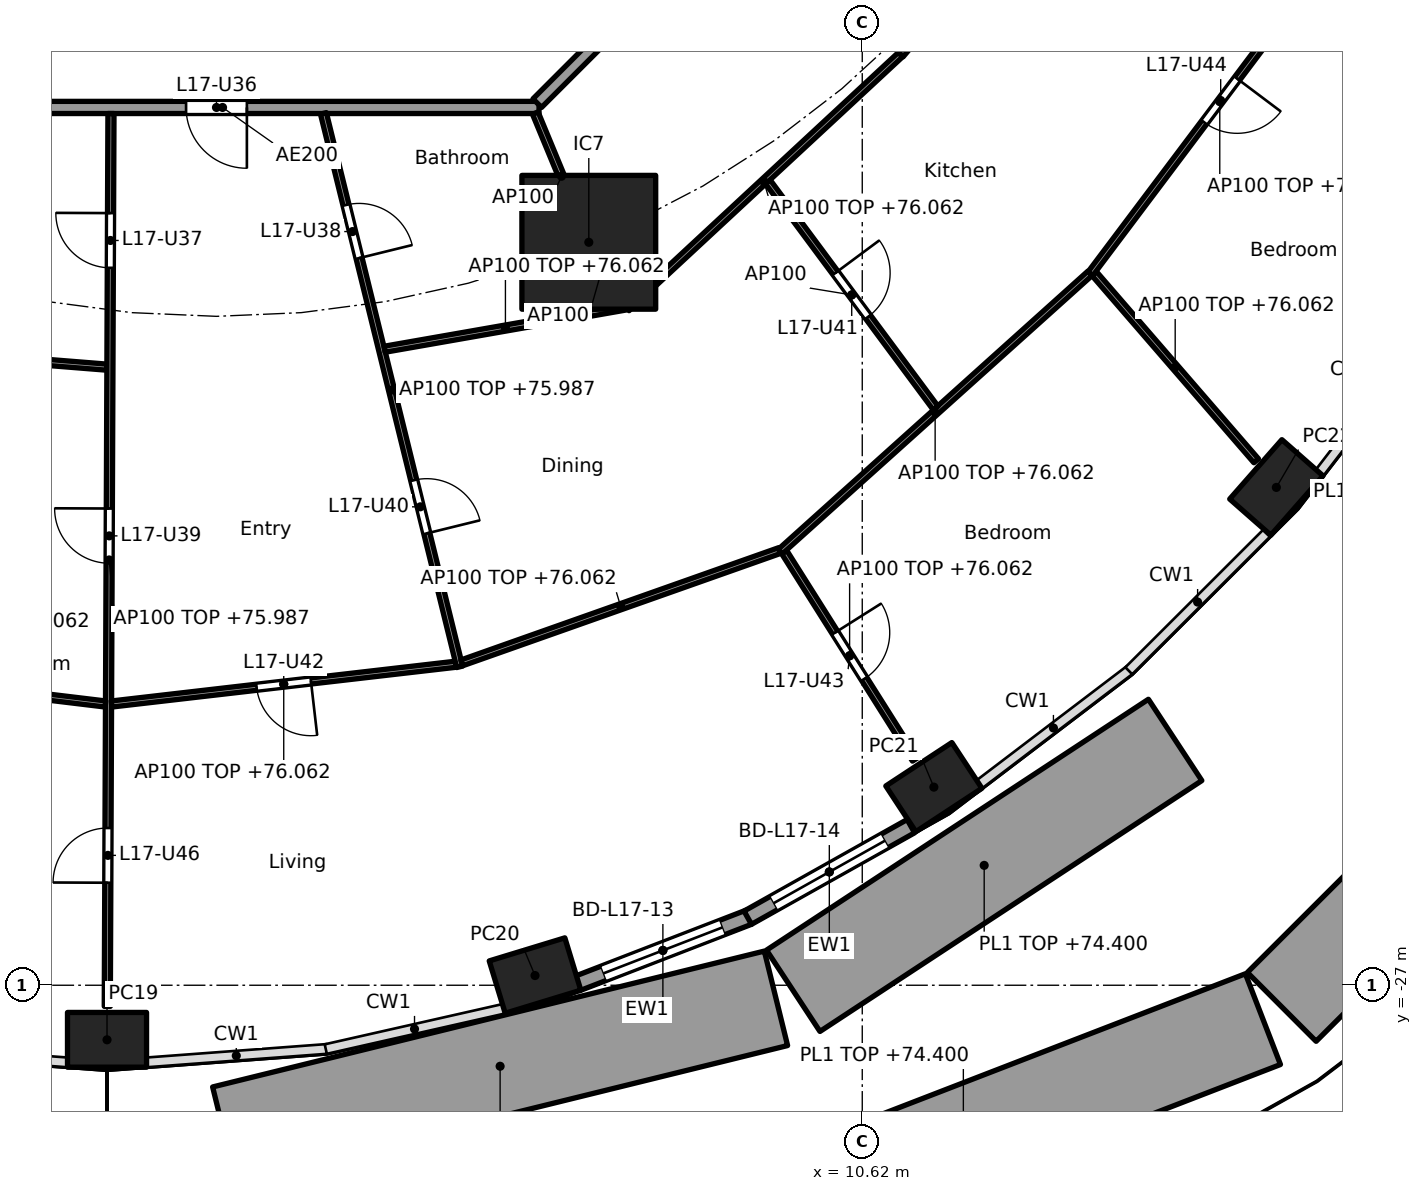
"""IFC4 building model, lengths in metres.
Left out: names, types, materials, properties, quantities, classifications, styles, units other than length and angle.
Written with IfcOpenShell. Run it as: python <this file> out.ifc"""

import sys

from ifc_helpers import new_model, si_unit, direction, frame, frame_2d, origin, origin_2d, place, context, subcontext, project, spatial, rectangle, hollow_rectangle, extrude, element, fill, save


model = new_model("IFC4")
c1 = context("Model", 3, precision=1e-05, world=origin(), true_north=direction((0.0, 1.0)))
c2 = subcontext(c1, "Body", "Model", "MODEL_VIEW")
j1 = project(units=[si_unit("LENGTHUNIT", "METRE"), si_unit("PLANEANGLEUNIT", "RADIAN")], contexts=[c1])
p1 = place(None, origin())
s1 = spatial("IfcSite", under=j1, at=p1, CompositionType="ELEMENT")
p2 = place(p1, origin())
s2 = spatial("IfcBuilding", under=s1, at=p2, CompositionType="ELEMENT")
p3 = place(p2, frame((0.0, 0.0, 73.3)))
s3 = spatial("IfcBuildingStorey", under=s2, at=p3, CompositionType="ELEMENT", Elevation=73.3)
for number, where, z_axis, x_axis in (
    (1, (-1.8, -27.897, -0.26), (0.0, 0.0, 1.0), (1.0, 0.0, 0.0)),
    (2, (5.239, -26.841, -0.26), (0.0, 0.0, 1.0), (0.957, 0.292, 0.0)),
    (3, (11.798, -23.742, -0.26), (0.0, 0.0, 1.0), (0.836, 0.549, 0.0)),
    (4, (17.43, -18.813, -0.26), (0.0, 0.0, 1.0), (0.66, 0.751, 0.0)),
):
    element("IfcColumn", number, at=place(p3, frame(where, z_axis=z_axis, x_axis=x_axis)), inside=s3, PredefinedType="COLUMN", context=c2, shape_type="SweptSolid", body=[
        extrude(hollow_rectangle(XDim=1.3, YDim=0.9, WallThickness=0.045, at=origin_2d()), origin(), (0.0, 0.0, 1.0), 3.96),
    ])
p4 = place(p3, frame((6.123, -14.782, 0.0), z_axis=(0.0, 0.0, 1.0), x_axis=(1.0, 0.0, 0.0)))
e5 = element("IfcColumn", 5, at=p4, inside=s3, PredefinedType="COLUMN", context=c2, shape_type="SweptSolid", body=[
    extrude(rectangle(XDim=2.2, YDim=2.2, at=origin_2d()), origin(), (0.0, 0.0, 1.0), 3.7),
])
p5 = place(p3, frame((8.753, -25.882, 0.0), z_axis=(0.0, 0.0, 1.0), x_axis=(-0.932837560624, -0.360297218263, 0.0)))
e6 = element("IfcWall", 6, at=p5, inside=s3, PredefinedType="SOLIDWALL", context=c2, shape_type="SweptSolid", body=[
    extrude(rectangle(XDim=3.028, YDim=0.25, at=frame_2d((1.514, 0.0))), origin(), (0.0, 0.0, 1.0), 3.44),
])
p6 = place(p5, frame((0.464, 0.0, 0.0)))
e7 = element("IfcOpeningElement", 7, at=p6, cuts=e6, PredefinedType="OPENING", context=c2, shape_type="SweptSolid", body=[
    extrude(rectangle(XDim=2.1, YDim=2.4, at=frame_2d((1.05, 1.2))), frame((0.0, 0.135, 0.0), z_axis=(0.0, -1.0, 0.0), x_axis=(1.0, 0.0, 0.0)), (0.0, 0.0, 1.0), 0.27),
])
p7 = place(p3, frame((11.419, -24.384, 0.0), z_axis=(0.0, 0.0, 1.0), x_axis=(-0.872071158476, -0.489379090843, 0.0)))
e8 = element("IfcWall", 8, at=p7, inside=s3, PredefinedType="SOLIDWALL", context=c2, shape_type="SweptSolid", body=[
    extrude(rectangle(XDim=3.076, YDim=0.25, at=frame_2d((1.538, 0.0))), origin(), (0.0, 0.0, 1.0), 3.44),
])
p8 = place(p7, frame((0.488, 0.0, 0.0)))
e9 = element("IfcOpeningElement", 9, at=p8, cuts=e8, PredefinedType="OPENING", context=c2, shape_type="SweptSolid", body=[
    extrude(rectangle(XDim=2.1, YDim=2.4, at=frame_2d((1.05, 1.2))), frame((0.0, 0.135, 0.0), z_axis=(0.0, -1.0, 0.0), x_axis=(1.0, 0.0, 0.0)), (0.0, 0.0, 1.0), 0.27),
])
p9 = place(p3, frame((0.128, -29.449, 0.0), z_axis=(0.0, 0.0, 1.0), x_axis=(0.970994070272, 0.239103566467, 0.0)))
e10 = element("IfcWall", 10, at=p9, inside=s3, PredefinedType="SOLIDWALL", context=c2, shape_type="SweptSolid", body=[
    extrude(rectangle(XDim=9.344, YDim=1.6, at=frame_2d((4.672, 0.0))), origin(), (0.0, 0.0, 1.0), 1.1),
])
p10 = place(p3, frame((9.485, -27.091, 0.0), z_axis=(0.0, 0.0, 1.0), x_axis=(0.8357902563, 0.549048857091, 0.0)))
e11 = element("IfcWall", 11, at=p10, inside=s3, PredefinedType="SOLIDWALL", context=c2, shape_type="SweptSolid", body=[
    extrude(rectangle(XDim=7.514, YDim=1.6, at=frame_2d((3.757, 0.0))), origin(), (0.0, 0.0, 1.0), 1.1),
])
p11 = place(p3, frame((17.209, -27.557, 0.0), z_axis=(0.0, 0.0, 1.0), x_axis=(-0.932765991622, -0.360482461255, 0.0)))
e12 = element("IfcWall", 12, at=p11, inside=s3, PredefinedType="SOLIDWALL", context=c2, shape_type="SweptSolid", body=[
    extrude(rectangle(XDim=10.563, YDim=1.6, at=frame_2d((5.282, 0.0))), origin(), (0.0, 0.0, 1.0), 1.1),
])
p12 = place(p3, frame((25.423, -19.465, 0.0), z_axis=(0.0, 0.0, 1.0), x_axis=(-0.707707630173, -0.706505421208, 0.0)))
e13 = element("IfcWall", 13, at=p12, inside=s3, PredefinedType="SOLIDWALL", context=c2, shape_type="SweptSolid", body=[
    extrude(rectangle(XDim=11.169, YDim=1.6, at=frame_2d((5.584, 0.0))), origin(), (0.0, 0.0, 1.0), 1.1),
])
p13 = place(p3, frame((14.82, -6.156, 0.0), z_axis=(0.0, 0.0, 1.0), x_axis=(0.750582231659, -0.660777052808, 0.0)))
e14 = element("IfcWall", 14, at=p13, inside=s3, PredefinedType="PARTITIONING", context=c2, shape_type="SweptSolid", body=[
    extrude(rectangle(XDim=8.781, YDim=0.2, at=frame_2d((4.391, 0.0))), origin(), (0.0, 0.0, 1.0), 2.762),
])
p14 = place(p3, frame((-5.104, -12.565, 0.0), z_axis=(0.0, 0.0, 1.0), x_axis=(1.0, 0.0, 0.0)))
e15 = element("IfcWall", 15, at=p14, inside=s3, PredefinedType="PARTITIONING", context=c2, shape_type="SweptSolid", body=[
    extrude(rectangle(XDim=10.409, YDim=0.2, at=frame_2d((5.205, 0.0))), origin(), (0.0, 0.0, 1.0), 3.44),
])
p15 = place(p14, frame((4.604, 0.0, 0.0)))
e16 = element("IfcOpeningElement", 16, at=p15, cuts=e15, PredefinedType="OPENING", context=c2, shape_type="SweptSolid", body=[
    extrude(rectangle(XDim=1.0, YDim=2.1, at=frame_2d((0.5, 1.05))), frame((0.0, 0.11, 0.0), z_axis=(0.0, -1.0, 0.0), x_axis=(1.0, 0.0, 0.0)), (0.0, 0.0, 1.0), 0.22),
])
p16 = place(p3, frame((5.275, -12.494, 0.0), z_axis=(0.0, 0.0, 1.0), x_axis=(0.707106781187, 0.707106781187, 0.0)))
e17 = element("IfcWall", 17, at=p16, inside=s3, PredefinedType="PARTITIONING", context=c2, shape_type="SweptSolid", body=[
    extrude(rectangle(XDim=10.409, YDim=0.2, at=frame_2d((5.205, 0.0))), origin(), (0.0, 0.0, 1.0), 3.44),
])
p17 = place(p3, frame((-6.404, -16.468, 0.0), z_axis=(0.0, 0.0, 1.0), x_axis=(0.996818808981, -0.079701079432, 0.0)))
e18 = element("IfcWall", 18, at=p17, inside=s3, PredefinedType="PARTITIONING", context=c2, shape_type="SweptSolid", body=[
    extrude(rectangle(XDim=4.616, YDim=0.1, at=frame_2d((2.308, 0.0))), origin(), (0.0, 0.0, 1.0), 2.762),
])
p18 = place(p3, frame((-7.586, -21.68, 0.0), z_axis=(0.0, 0.0, 1.0), x_axis=(0.992810189026, -0.119699325668, 0.0)))
e19 = element("IfcWall", 19, at=p18, inside=s3, PredefinedType="PARTITIONING", context=c2, shape_type="SweptSolid", body=[
    extrude(rectangle(XDim=5.803, YDim=0.1, at=frame_2d((2.901, 0.0))), origin(), (0.0, 0.0, 1.0), 2.762),
])
p19 = place(p18, frame((0.988, 0.0, 0.0)))
e20 = element("IfcOpeningElement", 20, at=p19, cuts=e19, PredefinedType="OPENING", context=c2, shape_type="SweptSolid", body=[
    extrude(rectangle(XDim=0.9, YDim=2.1, at=frame_2d((0.45, 1.05))), frame((0.0, 0.06, 0.0), z_axis=(0.0, -1.0, 0.0), x_axis=(1.0, 0.0, 0.0)), (0.0, 0.0, 1.0), 0.12),
])
p20 = place(p3, frame((-1.735, -12.665, 0.0), z_axis=(0.0, 0.0, 1.0), x_axis=(-0.004107048833, -0.999991566039, 0.0)))
e21 = element("IfcWall", 21, at=p20, inside=s3, PredefinedType="PARTITIONING", context=c2, shape_type="SweptSolid", body=[
    extrude(rectangle(XDim=14.683, YDim=0.1, at=frame_2d((7.341, 0.0))), origin(), (0.0, 0.0, 1.0), 2.687),
])
p21 = place(p20, frame((1.637, 0.0, 0.0)))
e22 = element("IfcOpeningElement", 22, at=p21, cuts=e21, PredefinedType="OPENING", context=c2, shape_type="SweptSolid", body=[
    extrude(rectangle(XDim=0.9, YDim=2.1, at=frame_2d((0.45, 1.05))), frame((0.0, 0.06, 0.0), z_axis=(0.0, -1.0, 0.0), x_axis=(1.0, 0.0, 0.0)), (0.0, 0.0, 1.0), 0.12),
])
p22 = place(p20, frame((6.496, 0.0, 0.0)))
e23 = element("IfcOpeningElement", 23, at=p22, cuts=e21, PredefinedType="OPENING", context=c2, shape_type="SweptSolid", body=[
    extrude(rectangle(XDim=0.9, YDim=2.1, at=frame_2d((0.45, 1.05))), frame((0.0, 0.06, 0.0), z_axis=(0.0, -1.0, 0.0), x_axis=(1.0, 0.0, 0.0)), (0.0, 0.0, 1.0), 0.12),
])
p23 = place(p20, frame((11.75, 0.0, 0.0)))
e24 = element("IfcOpeningElement", 24, at=p23, cuts=e21, PredefinedType="OPENING", context=c2, shape_type="SweptSolid", body=[
    extrude(rectangle(XDim=0.9, YDim=2.1, at=frame_2d((0.45, 1.05))), frame((0.0, 0.06, 0.0), z_axis=(0.0, -1.0, 0.0), x_axis=(1.0, 0.0, 0.0)), (0.0, 0.0, 1.0), 0.12),
])
p24 = place(p3, frame((-1.726, -22.375, 0.0), z_axis=(0.0, 0.0, 1.0), x_axis=(0.99339223329, 0.114768771187, 0.0)))
e25 = element("IfcWall", 25, at=p24, inside=s3, PredefinedType="PARTITIONING", context=c2, shape_type="SweptSolid", body=[
    extrude(rectangle(XDim=5.701, YDim=0.1, at=frame_2d((2.851, 0.0))), origin(), (0.0, 0.0, 1.0), 2.762),
])
p25 = place(p24, frame((2.4, 0.0, 0.0)))
e26 = element("IfcOpeningElement", 26, at=p25, cuts=e25, PredefinedType="OPENING", context=c2, shape_type="SweptSolid", body=[
    extrude(rectangle(XDim=0.9, YDim=2.1, at=frame_2d((0.45, 1.05))), frame((0.0, 0.06, 0.0), z_axis=(0.0, -1.0, 0.0), x_axis=(1.0, 0.0, 0.0)), (0.0, 0.0, 1.0), 0.12),
])
p26 = place(p3, frame((1.759, -12.662, 0.0), z_axis=(0.0, 0.0, 1.0), x_axis=(0.239022447434, -0.971014041929, 0.0)))
e27 = element("IfcWall", 27, at=p26, inside=s3, PredefinedType="PARTITIONING", context=c2, shape_type="SweptSolid", body=[
    extrude(rectangle(XDim=9.374, YDim=0.1, at=frame_2d((4.687, 0.0))), origin(), (0.0, 0.0, 1.0), 2.687),
])
p27 = place(p26, frame((1.552, 0.0, 0.0)))
e28 = element("IfcOpeningElement", 28, at=p27, cuts=e27, PredefinedType="OPENING", context=c2, shape_type="SweptSolid", body=[
    extrude(rectangle(XDim=0.9, YDim=2.1, at=frame_2d((0.45, 1.05))), frame((0.0, 0.06, 0.0), z_axis=(0.0, -1.0, 0.0), x_axis=(1.0, 0.0, 0.0)), (0.0, 0.0, 1.0), 0.12),
])
p28 = place(p26, frame((6.214, 0.0, 0.0)))
e29 = element("IfcOpeningElement", 29, at=p28, cuts=e27, PredefinedType="OPENING", context=c2, shape_type="SweptSolid", body=[
    extrude(rectangle(XDim=0.9, YDim=2.1, at=frame_2d((0.45, 1.05))), frame((0.0, 0.06, 0.0), z_axis=(0.0, -1.0, 0.0), x_axis=(1.0, 0.0, 0.0)), (0.0, 0.0, 1.0), 0.12),
])
p29 = place(p3, frame((2.765, -16.541, 0.0), z_axis=(0.0, 0.0, 1.0), x_axis=(0.985002709003, 0.172538874623, 0.0)))
e30 = element("IfcWall", 30, at=p29, inside=s3, PredefinedType="PARTITIONING", context=c2, shape_type="SweptSolid", body=[
    extrude(rectangle(XDim=4.034, YDim=0.1, at=frame_2d((2.017, 0.0))), origin(), (0.0, 0.0, 1.0), 2.762),
])
p30 = place(p3, frame((4.034, -21.698, 0.0), z_axis=(0.0, 0.0, 1.0), x_axis=(0.942864271692, 0.333177077794, 0.0)))
e31 = element("IfcWall", 31, at=p30, inside=s3, PredefinedType="PARTITIONING", context=c2, shape_type="SweptSolid", body=[
    extrude(rectangle(XDim=5.545, YDim=0.1, at=frame_2d((2.772, 0.0))), origin(), (0.0, 0.0, 1.0), 2.762),
])
p31 = place(p3, frame((5.243, -12.657, 0.0), z_axis=(0.0, 0.0, 1.0), x_axis=(0.382719158442, -0.923864733477, 0.0)))
e32 = element("IfcWall", 32, at=p31, inside=s3, PredefinedType="PARTITIONING", context=c2, shape_type="SweptSolid", body=[
    extrude(rectangle(XDim=2.25, YDim=0.1, at=frame_2d((1.125, 0.0))), origin(), (0.0, 0.0, 1.0), 3.44),
])
p32 = place(p3, frame((6.751, -15.87, 0.0), z_axis=(0.0, 0.0, 1.0), x_axis=(0.733003105791, 0.680225291283, 0.0)))
e33 = element("IfcWall", 33, at=p32, inside=s3, PredefinedType="PARTITIONING", context=c2, shape_type="SweptSolid", body=[
    extrude(rectangle(XDim=6.138, YDim=0.1, at=frame_2d((3.069, 0.0))), origin(), (0.0, 0.0, 1.0), 2.762),
])
p33 = place(p3, frame((9.336, -19.877, 0.0), z_axis=(0.0, 0.0, 1.0), x_axis=(0.533525984139, -0.845783674617, 0.0)))
e34 = element("IfcWall", 34, at=p33, inside=s3, PredefinedType="PARTITIONING", context=c2, shape_type="SweptSolid", body=[
    extrude(rectangle(XDim=4.033, YDim=0.1, at=frame_2d((2.016, 0.0))), origin(), (0.0, 0.0, 1.0), 2.762),
])
p34 = place(p33, frame((1.566, 0.0, 0.0)))
e35 = element("IfcOpeningElement", 35, at=p34, cuts=e34, PredefinedType="OPENING", context=c2, shape_type="SweptSolid", body=[
    extrude(rectangle(XDim=0.9, YDim=2.1, at=frame_2d((0.45, 1.05))), frame((0.0, 0.06, 0.0), z_axis=(0.0, -1.0, 0.0), x_axis=(1.0, 0.0, 0.0)), (0.0, 0.0, 1.0), 0.12),
])
p35 = place(p3, frame((9.272, -19.868, 0.0), z_axis=(0.0, 0.0, 1.0), x_axis=(0.743884413566, 0.668308296562, 0.0)))
e36 = element("IfcWall", 36, at=p35, inside=s3, PredefinedType="PARTITIONING", context=c2, shape_type="SweptSolid", body=[
    extrude(rectangle(XDim=6.845, YDim=0.1, at=frame_2d((3.423, 0.0))), origin(), (0.0, 0.0, 1.0), 2.762),
])
p36 = place(p3, frame((9.067, -13.789, 0.0), z_axis=(0.0, 0.0, 1.0), x_axis=(0.5958491185, -0.80309640018, 0.0)))
e37 = element("IfcWall", 37, at=p36, inside=s3, PredefinedType="PARTITIONING", context=c2, shape_type="SweptSolid", body=[
    extrude(rectangle(XDim=4.63, YDim=0.1, at=frame_2d((2.315, 0.0))), origin(), (0.0, 0.0, 1.0), 3.44),
])
p37 = place(p36, frame((1.865, 0.0, 0.0)))
e38 = element("IfcOpeningElement", 38, at=p37, cuts=e37, PredefinedType="OPENING", context=c2, shape_type="SweptSolid", body=[
    extrude(rectangle(XDim=0.9, YDim=2.1, at=frame_2d((0.45, 1.05))), frame((0.0, 0.06, 0.0), z_axis=(0.0, -1.0, 0.0), x_axis=(1.0, 0.0, 0.0)), (0.0, 0.0, 1.0), 0.12),
])
p38 = place(p3, frame((11.255, -11.699, 0.0), z_axis=(0.0, 0.0, 1.0), x_axis=(0.646107653745, 0.763246290375, 0.0)))
e39 = element("IfcWall", 39, at=p38, inside=s3, PredefinedType="PARTITIONING", context=c2, shape_type="SweptSolid", body=[
    extrude(rectangle(XDim=6.417, YDim=0.1, at=frame_2d((3.208, 0.0))), origin(), (0.0, 0.0, 1.0), 2.762),
])
p39 = place(p38, frame((2.784, 0.0, 0.0)))
e40 = element("IfcOpeningElement", 40, at=p39, cuts=e39, PredefinedType="OPENING", context=c2, shape_type="SweptSolid", body=[
    extrude(rectangle(XDim=0.9, YDim=2.1, at=frame_2d((0.45, 1.05))), frame((0.0, 0.06, 0.0), z_axis=(0.0, -1.0, 0.0), x_axis=(1.0, 0.0, 0.0)), (0.0, 0.0, 1.0), 0.12),
])
p40 = place(p3, frame((14.435, -15.297, 0.0), z_axis=(0.0, 0.0, 1.0), x_axis=(0.654405107766, -0.756144136345, 0.0)))
e41 = element("IfcWall", 41, at=p40, inside=s3, PredefinedType="PARTITIONING", context=c2, shape_type="SweptSolid", body=[
    extrude(rectangle(XDim=4.07, YDim=0.1, at=frame_2d((2.035, 0.0))), origin(), (0.0, 0.0, 1.0), 2.762),
])
p41 = place(p3, frame((14.372, -15.3, 0.0), z_axis=(0.0, 0.0, 1.0), x_axis=(0.600987107857, 0.79925871668, 0.0)))
e42 = element("IfcWall", 42, at=p41, inside=s3, PredefinedType="PARTITIONING", context=c2, shape_type="SweptSolid", body=[
    extrude(rectangle(XDim=7.08, YDim=0.1, at=frame_2d((3.54, 0.0))), origin(), (0.0, 0.0, 1.0), 2.762),
])
p42 = place(p41, frame((3.115, 0.0, 0.0)))
e43 = element("IfcOpeningElement", 43, at=p42, cuts=e42, PredefinedType="OPENING", context=c2, shape_type="SweptSolid", body=[
    extrude(rectangle(XDim=0.9, YDim=2.1, at=frame_2d((0.45, 1.05))), frame((0.0, 0.06, 0.0), z_axis=(0.0, -1.0, 0.0), x_axis=(1.0, 0.0, 0.0)), (0.0, 0.0, 1.0), 0.12),
])
p43 = place(p3, frame((6.051, -14.855, 0.0), z_axis=(0.0, 0.0, 1.0), x_axis=(0.533542828537, -0.845773048824, 0.0)))
e44 = element("IfcWall", 44, at=p43, inside=s3, PredefinedType="PARTITIONING", context=c2, shape_type="SweptSolid", body=[
    extrude(rectangle(XDim=1.021, YDim=0.1, at=frame_2d((0.51, 0.0))), origin(), (0.0, 0.0, 1.0), 3.44),
])
p44 = place(p6, origin())
e45 = element("IfcDoor", 45, at=p44, inside=s3, OperationType="SLIDING_TO_LEFT", PredefinedType="DOOR", context=c2, shape_type="SweptSolid", body=[
    extrude(rectangle(XDim=2.1, YDim=2.4, at=frame_2d((1.05, 1.2))), frame((0.0, 0.025, 0.0), z_axis=(0.0, -1.0, 0.0), x_axis=(1.0, 0.0, 0.0)), (0.0, 0.0, 1.0), 0.05),
])
fill(e7, e45)
p45 = place(p8, origin())
e46 = element("IfcDoor", 46, at=p45, inside=s3, OperationType="SLIDING_TO_LEFT", PredefinedType="DOOR", context=c2, shape_type="SweptSolid", body=[
    extrude(rectangle(XDim=2.1, YDim=2.4, at=frame_2d((1.05, 1.2))), frame((0.0, 0.025, 0.0), z_axis=(0.0, -1.0, 0.0), x_axis=(1.0, 0.0, 0.0)), (0.0, 0.0, 1.0), 0.05),
])
fill(e9, e46)
p46 = place(p15, frame((1.0, 0.0, 0.0), x_axis=(-1.0, 0.0, 0.0)))
e47 = element("IfcDoor", 47, at=p46, inside=s3, OperationType="SINGLE_SWING_LEFT", PredefinedType="DOOR", context=c2, shape_type="SweptSolid", body=[
    extrude(rectangle(XDim=1.0, YDim=2.1, at=frame_2d((0.5, 1.05))), frame((0.0, 0.025, 0.0), z_axis=(0.0, -1.0, 0.0), x_axis=(1.0, 0.0, 0.0)), (0.0, 0.0, 1.0), 0.05),
])
fill(e16, e47)
p47 = place(p21, frame((0.9, 0.0, 0.0), x_axis=(-1.0, 0.0, 0.0)))
e48 = element("IfcDoor", 48, at=p47, inside=s3, OperationType="SINGLE_SWING_RIGHT", PredefinedType="DOOR", context=c2, shape_type="SweptSolid", body=[
    extrude(rectangle(XDim=0.9, YDim=2.1, at=frame_2d((0.45, 1.05))), frame((0.0, 0.025, 0.0), z_axis=(0.0, -1.0, 0.0), x_axis=(1.0, 0.0, 0.0)), (0.0, 0.0, 1.0), 0.05),
])
fill(e22, e48)
p48 = place(p27, origin())
e49 = element("IfcDoor", 49, at=p48, inside=s3, OperationType="SINGLE_SWING_RIGHT", PredefinedType="DOOR", context=c2, shape_type="SweptSolid", body=[
    extrude(rectangle(XDim=0.9, YDim=2.1, at=frame_2d((0.45, 1.05))), frame((0.0, 0.025, 0.0), z_axis=(0.0, -1.0, 0.0), x_axis=(1.0, 0.0, 0.0)), (0.0, 0.0, 1.0), 0.05),
])
fill(e28, e49)
p49 = place(p22, frame((0.9, 0.0, 0.0), x_axis=(-1.0, 0.0, 0.0)))
e50 = element("IfcDoor", 50, at=p49, inside=s3, OperationType="SINGLE_SWING_RIGHT", PredefinedType="DOOR", context=c2, shape_type="SweptSolid", body=[
    extrude(rectangle(XDim=0.9, YDim=2.1, at=frame_2d((0.45, 1.05))), frame((0.0, 0.025, 0.0), z_axis=(0.0, -1.0, 0.0), x_axis=(1.0, 0.0, 0.0)), (0.0, 0.0, 1.0), 0.05),
])
fill(e23, e50)
p50 = place(p28, origin())
e51 = element("IfcDoor", 51, at=p50, inside=s3, OperationType="SINGLE_SWING_RIGHT", PredefinedType="DOOR", context=c2, shape_type="SweptSolid", body=[
    extrude(rectangle(XDim=0.9, YDim=2.1, at=frame_2d((0.45, 1.05))), frame((0.0, 0.025, 0.0), z_axis=(0.0, -1.0, 0.0), x_axis=(1.0, 0.0, 0.0)), (0.0, 0.0, 1.0), 0.05),
])
fill(e29, e51)
p51 = place(p37, origin())
e52 = element("IfcDoor", 52, at=p51, inside=s3, OperationType="SINGLE_SWING_LEFT", PredefinedType="DOOR", context=c2, shape_type="SweptSolid", body=[
    extrude(rectangle(XDim=0.9, YDim=2.1, at=frame_2d((0.45, 1.05))), frame((0.0, 0.025, 0.0), z_axis=(0.0, -1.0, 0.0), x_axis=(1.0, 0.0, 0.0)), (0.0, 0.0, 1.0), 0.05),
])
fill(e38, e52)
p52 = place(p25, frame((0.9, 0.0, 0.0), x_axis=(-1.0, 0.0, 0.0)))
e53 = element("IfcDoor", 53, at=p52, inside=s3, OperationType="SINGLE_SWING_LEFT", PredefinedType="DOOR", context=c2, shape_type="SweptSolid", body=[
    extrude(rectangle(XDim=0.9, YDim=2.1, at=frame_2d((0.45, 1.05))), frame((0.0, 0.025, 0.0), z_axis=(0.0, -1.0, 0.0), x_axis=(1.0, 0.0, 0.0)), (0.0, 0.0, 1.0), 0.05),
])
fill(e26, e53)
p53 = place(p34, origin())
e54 = element("IfcDoor", 54, at=p53, inside=s3, OperationType="SINGLE_SWING_LEFT", PredefinedType="DOOR", context=c2, shape_type="SweptSolid", body=[
    extrude(rectangle(XDim=0.9, YDim=2.1, at=frame_2d((0.45, 1.05))), frame((0.0, 0.025, 0.0), z_axis=(0.0, -1.0, 0.0), x_axis=(1.0, 0.0, 0.0)), (0.0, 0.0, 1.0), 0.05),
])
fill(e35, e54)
p54 = place(p42, frame((0.9, 0.0, 0.0), x_axis=(-1.0, 0.0, 0.0)))
e55 = element("IfcDoor", 55, at=p54, inside=s3, OperationType="SINGLE_SWING_LEFT", PredefinedType="DOOR", context=c2, shape_type="SweptSolid", body=[
    extrude(rectangle(XDim=0.9, YDim=2.1, at=frame_2d((0.45, 1.05))), frame((0.0, 0.025, 0.0), z_axis=(0.0, -1.0, 0.0), x_axis=(1.0, 0.0, 0.0)), (0.0, 0.0, 1.0), 0.05),
])
fill(e43, e55)
p55 = place(p23, frame((0.9, 0.0, 0.0), x_axis=(-1.0, 0.0, 0.0)))
e56 = element("IfcDoor", 56, at=p55, inside=s3, OperationType="SINGLE_SWING_LEFT", PredefinedType="DOOR", context=c2, shape_type="SweptSolid", body=[
    extrude(rectangle(XDim=0.9, YDim=2.1, at=frame_2d((0.45, 1.05))), frame((0.0, 0.025, 0.0), z_axis=(0.0, -1.0, 0.0), x_axis=(1.0, 0.0, 0.0)), (0.0, 0.0, 1.0), 0.05),
])
fill(e24, e56)
save(model, sys.argv[1])
